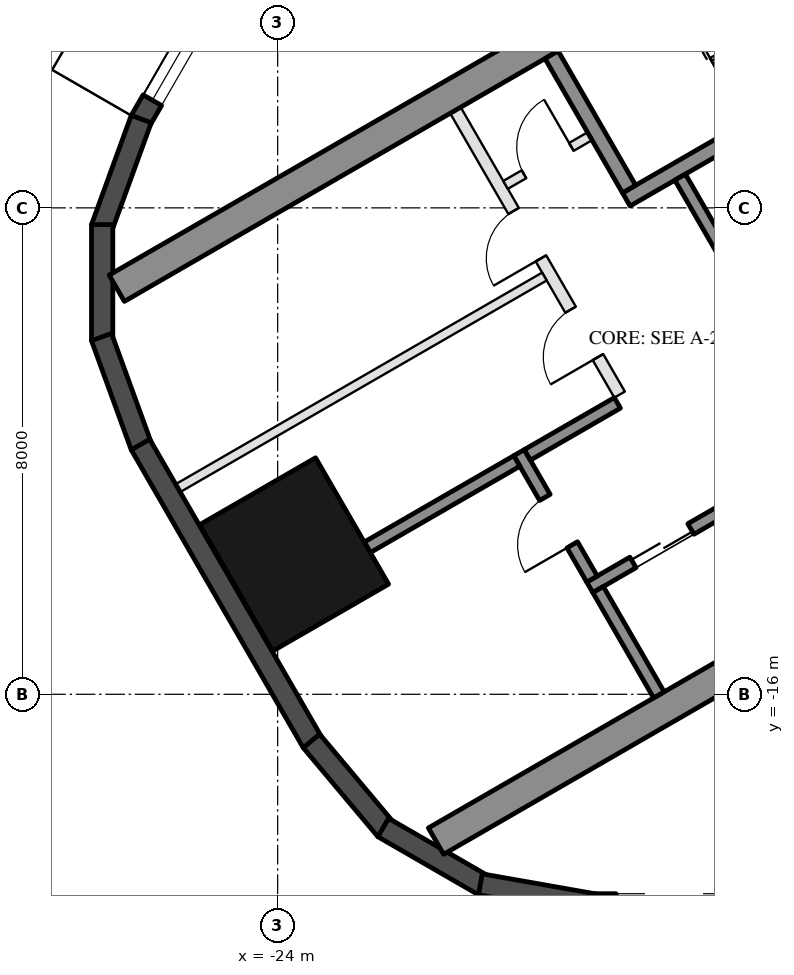
"""IFC4 building model, lengths in metres.
Left out: names, types, materials, properties, quantities, classifications, styles, units other than length and angle.
Written with IfcOpenShell. Run it as: python <this file> out.ifc"""

import sys

from ifc_helpers import new_model, si_unit, direction, frame, frame_2d, origin, origin_2d, place, context, subcontext, project, spatial, rectangle, hollow_rectangle, extrude, element, fill, save


model = new_model("IFC4")
c1 = context("Model", 3, precision=1e-05, world=origin(), true_north=direction((0.0, 1.0)))
c2 = subcontext(c1, "Body", "Model", "MODEL_VIEW")
j1 = project(units=[si_unit("LENGTHUNIT", "METRE"), si_unit("PLANEANGLEUNIT", "RADIAN")], contexts=[c1])
p1 = place(None, origin())
s1 = spatial("IfcSite", under=j1, at=p1, CompositionType="ELEMENT")
p2 = place(p1, origin())
s2 = spatial("IfcBuilding", under=s1, at=p2, CompositionType="ELEMENT")
p3 = place(p2, frame((0.0, 0.0, 202.1)))
s3 = spatial("IfcBuildingStorey", under=s2, at=p3, CompositionType="ELEMENT", Elevation=202.1)
p4 = place(p3, frame((-23.729, -13.7, 0.0), z_axis=(0.0, 0.0, 1.0), x_axis=(-0.5, 0.866025403784, 0.0)))
e1 = element("IfcColumn", 1, at=p4, inside=s3, PredefinedType="COLUMN", context=c2, shape_type="SweptSolid", body=[
    extrude(hollow_rectangle(XDim=2.4, YDim=2.2, WallThickness=0.06, at=origin_2d()), origin(), (0.0, 0.0, 1.0), 3.7),
])
p5 = place(p3, frame((-24.299, -3.176, 0.0), z_axis=(0.0, 0.0, 1.0), x_axis=(-0.500028278809, -0.866009076391, 0.0)))
e2 = element("IfcWall", 2, at=p5, inside=s3, PredefinedType="SOLIDWALL", context=c2, shape_type="SweptSolid", body=[
    extrude(rectangle(XDim=3.916, YDim=0.35, at=frame_2d((1.958, 0.0))), origin(), (0.0, 0.0, 1.0), 3.55),
])
p6 = place(p5, frame((1.625, 0.0, 0.3)))
e3 = element("IfcOpeningElement", 3, at=p6, cuts=e2, PredefinedType="OPENING", context=c2, shape_type="SweptSolid", body=[
    extrude(rectangle(XDim=1.9, YDim=2.65, at=frame_2d((0.95, 1.325))), frame((0.0, 0.185, 0.0), z_axis=(0.0, -1.0, 0.0), x_axis=(1.0, 0.0, 0.0)), (0.0, 0.0, 1.0), 0.37),
])
for number, where, z_axis, x_axis in (
    (4, (-26.244, -6.54, 0.0), (0.0, 0.0, 1.0), (-0.342, -0.94, 0.0)),
    (5, (-26.886, -8.275, 0.0), (0.0, 0.0, 1.0), (0.0, -1.0, 0.0)),
    (6, (-26.897, -10.125, 0.0), (0.0, 0.0, 1.0), (0.342, -0.94, 0.0)),
):
    element("IfcWall", number, at=place(p3, frame(where, z_axis=z_axis, x_axis=x_axis)), inside=s3, PredefinedType="SOLIDWALL", context=c2, shape_type="SweptSolid", body=[
        extrude(rectangle(XDim=1.91, YDim=0.35, at=frame_2d((0.955, 0.0))), origin(), (0.0, 0.0, 1.0), 3.55),
    ])
p7 = place(p3, frame((-26.257, -11.893, 0.0), z_axis=(0.0, 0.0, 1.0), x_axis=(0.500018773155, -0.866014564827, 0.0)))
e7 = element("IfcWall", 7, at=p7, inside=s3, PredefinedType="SOLIDWALL", context=c2, shape_type="SweptSolid", body=[
    extrude(rectangle(XDim=5.658, YDim=0.35, at=frame_2d((2.829, 0.0))), origin(), (0.0, 0.0, 1.0), 3.55),
])
for number, where, z_axis, x_axis in (
    (8, (-23.445, -16.768, 0.0), (0.0, 0.0, 1.0), (0.643, -0.766, 0.0)),
    (9, (-22.264, -18.192, 0.0), (0.0, 0.0, 1.0), (0.866, -0.5, 0.0)),
):
    element("IfcWall", number, at=place(p3, frame(where, z_axis=z_axis, x_axis=x_axis)), inside=s3, PredefinedType="SOLIDWALL", context=c2, shape_type="SweptSolid", body=[
        extrude(rectangle(XDim=1.91, YDim=0.35, at=frame_2d((0.955, 0.0))), origin(), (0.0, 0.0, 1.0), 3.55),
    ])
p8 = place(p3, frame((-20.667, -19.126, 0.0), z_axis=(0.0, 0.0, 1.0), x_axis=(0.984798995425, -0.173697837091, 0.0)))
e10 = element("IfcWall", 10, at=p8, inside=s3, PredefinedType="SOLIDWALL", context=c2, shape_type="SweptSolid", body=[
    extrude(rectangle(XDim=1.91, YDim=0.35, at=frame_2d((0.955, 0.0))), origin(), (0.0, 0.0, 1.0), 3.55),
])
p9 = place(p3, frame((-18.816, -19.455, 0.0), z_axis=(0.0, 0.0, 1.0), x_axis=(1.0, 0.0, 0.0)))
e11 = element("IfcWall", 11, at=p9, inside=s3, PredefinedType="SOLIDWALL", context=c2, shape_type="SweptSolid", body=[
    extrude(rectangle(XDim=11.816, YDim=0.35, at=frame_2d((5.908, 0.0))), origin(), (0.0, 0.0, 1.0), 3.55),
])
p10 = place(p9, frame((0.381, 0.0, 0.3)))
e12 = element("IfcOpeningElement", 12, at=p10, cuts=e11, PredefinedType="OPENING", context=c2, shape_type="SweptSolid", body=[
    extrude(rectangle(XDim=1.9, YDim=2.65, at=frame_2d((0.95, 1.325))), frame((0.0, 0.185, 0.0), z_axis=(0.0, -1.0, 0.0), x_axis=(1.0, 0.0, 0.0)), (0.0, 0.0, 1.0), 0.37),
])
p11 = place(p9, frame((7.79, 0.0, 0.0)))
e13 = element("IfcOpeningElement", 13, at=p11, cuts=e11, PredefinedType="OPENING", context=c2, shape_type="SweptSolid", body=[
    extrude(rectangle(XDim=2.4, YDim=2.4, at=frame_2d((1.2, 1.2))), frame((0.0, 0.185, 0.0), z_axis=(0.0, -1.0, 0.0), x_axis=(1.0, 0.0, 0.0)), (0.0, 0.0, 1.0), 0.37),
])
p12 = place(p9, frame((3.741, 0.0, 0.3)))
e14 = element("IfcOpeningElement", 14, at=p12, cuts=e11, PredefinedType="OPENING", context=c2, shape_type="SweptSolid", body=[
    extrude(rectangle(XDim=1.7, YDim=2.65, at=frame_2d((0.85, 1.325))), frame((0.0, 0.185, 0.0), z_axis=(0.0, -1.0, 0.0), x_axis=(1.0, 0.0, 0.0)), (0.0, 0.0, 1.0), 0.37),
])
p13 = place(p9, frame((5.741, 0.0, 0.3)))
e15 = element("IfcOpeningElement", 15, at=p13, cuts=e11, PredefinedType="OPENING", context=c2, shape_type="SweptSolid", body=[
    extrude(rectangle(XDim=1.7, YDim=2.65, at=frame_2d((0.85, 1.325))), frame((0.0, 0.185, 0.0), z_axis=(0.0, -1.0, 0.0), x_axis=(1.0, 0.0, 0.0)), (0.0, 0.0, 1.0), 0.37),
])
for number, where, z_axis, x_axis in (
    (16, (-13.797, -1.903, 0.0), (0.0, 0.0, 1.0), (-0.866, -0.5, 0.0)),
    (17, (-8.547, -10.997, 0.0), (0.0, 0.0, 1.0), (-0.866, -0.5, 0.0)),
):
    element("IfcWall", number, at=place(p3, frame(where, z_axis=z_axis, x_axis=x_axis)), inside=s3, PredefinedType="SHEAR", context=c2, shape_type="SweptSolid", body=[
        extrude(rectangle(XDim=14.837, YDim=0.5, at=frame_2d((7.418, 0.0))), origin(), (0.0, 0.0, 1.0), 3.5),
    ])
p14 = place(p3, frame((-12.681, -4.636, 0.0), z_axis=(0.0, 0.0, 1.0), x_axis=(-0.866021702275, -0.500006411147, 0.0)))
e18 = element("IfcWall", 18, at=p14, inside=s3, PredefinedType="SHEAR", context=c2, shape_type="SweptSolid", body=[
    extrude(rectangle(XDim=6.45, YDim=0.25, at=frame_2d((3.225, 0.0))), origin(), (0.0, 0.0, 1.0), 3.5),
])
p15 = place(p14, frame((0.3, 0.0, 0.0)))
e19 = element("IfcOpeningElement", 19, at=p15, cuts=e18, PredefinedType="OPENING", context=c2, shape_type="SweptSolid", body=[
    extrude(rectangle(XDim=1.0, YDim=2.1, at=frame_2d((0.5, 1.05))), frame((0.0, 0.135, 0.0), z_axis=(0.0, -1.0, 0.0), x_axis=(1.0, 0.0, 0.0)), (0.0, 0.0, 1.0), 0.27),
])
p16 = place(p3, frame((-19.496, -5.482, 0.0), z_axis=(0.0, 0.0, 1.0), x_axis=(0.499990435942, -0.866030925526, 0.0)))
e20 = element("IfcWall", 20, at=p16, inside=s3, PredefinedType="SHEAR", context=c2, shape_type="SweptSolid", body=[
    extrude(rectangle(XDim=2.55, YDim=0.25, at=frame_2d((1.275, 0.0))), origin(), (0.0, 0.0, 1.0), 3.5),
])
p17 = place(p3, frame((-17.381, -7.495, 0.0), z_axis=(0.0, 0.0, 1.0), x_axis=(0.500011755427, -0.866018616679, 0.0)))
e21 = element("IfcWall", 21, at=p17, inside=s3, PredefinedType="SHEAR", context=c2, shape_type="SweptSolid", body=[
    extrude(rectangle(XDim=2.8, YDim=0.2, at=frame_2d((1.4, 0.0))), origin(), (0.0, 0.0, 1.0), 3.5),
])
p18 = place(p3, frame((-10.068, -9.162, 0.0), z_axis=(0.0, 0.0, 1.0), x_axis=(-0.866032725843, -0.499987317609, 0.0)))
e22 = element("IfcWall", 22, at=p18, inside=s3, PredefinedType="SHEAR", context=c2, shape_type="SweptSolid", body=[
    extrude(rectangle(XDim=10.16, YDim=0.2, at=frame_2d((5.08, 0.0))), origin(), (0.0, 0.0, 1.0), 3.5),
])
p19 = place(p18, frame((0.62, 0.0, 0.0)))
e23 = element("IfcOpeningElement", 23, at=p19, cuts=e22, PredefinedType="OPENING", context=c2, shape_type="SweptSolid", body=[
    extrude(rectangle(XDim=1.1, YDim=2.1, at=frame_2d((0.55, 1.05))), frame((0.0, 0.11, 0.0), z_axis=(0.0, -1.0, 0.0), x_axis=(1.0, 0.0, 0.0)), (0.0, 0.0, 1.0), 0.22),
])
p20 = place(p18, frame((3.16, 0.0, 0.0)))
e24 = element("IfcOpeningElement", 24, at=p20, cuts=e22, PredefinedType="OPENING", context=c2, shape_type="SweptSolid", body=[
    extrude(rectangle(XDim=1.1, YDim=2.1, at=frame_2d((0.55, 1.05))), frame((0.0, 0.11, 0.0), z_axis=(0.0, -1.0, 0.0), x_axis=(1.0, 0.0, 0.0)), (0.0, 0.0, 1.0), 0.22),
])
p21 = place(p18, frame((5.7, 0.0, 0.0)))
e25 = element("IfcOpeningElement", 25, at=p21, cuts=e22, PredefinedType="OPENING", context=c2, shape_type="SweptSolid", body=[
    extrude(rectangle(XDim=1.1, YDim=2.1, at=frame_2d((0.55, 1.05))), frame((0.0, 0.11, 0.0), z_axis=(0.0, -1.0, 0.0), x_axis=(1.0, 0.0, 0.0)), (0.0, 0.0, 1.0), 0.22),
])
p22 = place(p18, frame((8.24, 0.0, 0.0)))
e26 = element("IfcOpeningElement", 26, at=p22, cuts=e22, PredefinedType="OPENING", context=c2, shape_type="SweptSolid", body=[
    extrude(rectangle(XDim=1.1, YDim=2.1, at=frame_2d((0.55, 1.05))), frame((0.0, 0.11, 0.0), z_axis=(0.0, -1.0, 0.0), x_axis=(1.0, 0.0, 0.0)), (0.0, 0.0, 1.0), 0.22),
])
p23 = place(p3, frame((-20.031, -12.026, 0.0), z_axis=(0.0, 0.0, 1.0), x_axis=(0.500033551112, -0.866006032174, 0.0)))
e27 = element("IfcWall", 27, at=p23, inside=s3, PredefinedType="SHEAR", context=c2, shape_type="SweptSolid", body=[
    extrude(rectangle(XDim=2.4, YDim=0.2, at=frame_2d((1.2, 0.0))), origin(), (0.0, 0.0, 1.0), 3.5),
])
p24 = place(p23, frame((0.85, 0.0, 0.0)))
e28 = element("IfcOpeningElement", 28, at=p24, cuts=e27, PredefinedType="OPENING", context=c2, shape_type="SweptSolid", body=[
    extrude(rectangle(XDim=0.9, YDim=2.1, at=frame_2d((0.45, 1.05))), frame((0.0, 0.11, 0.0), z_axis=(0.0, -1.0, 0.0), x_axis=(1.0, 0.0, 0.0)), (0.0, 0.0, 1.0), 0.22),
])
p25 = place(p3, frame((-18.413, -11.208, 0.0), z_axis=(0.0, 0.0, 1.0), x_axis=(-0.866038183914, -0.499977863513, 0.0)))
e29 = element("IfcWall", 29, at=p25, inside=s3, PredefinedType="SHEAR", context=c2, shape_type="SweptSolid", body=[
    extrude(rectangle(XDim=1.71, YDim=0.2, at=frame_2d((0.855, 0.0))), origin(), (0.0, 0.0, 1.0), 3.5),
])
p26 = place(p3, frame((-18.73, -14.278, 0.0), z_axis=(0.0, 0.0, 1.0), x_axis=(0.50002537861, -0.866010750942, 0.0)))
e30 = element("IfcWall", 30, at=p26, inside=s3, PredefinedType="SHEAR", context=c2, shape_type="SweptSolid", body=[
    extrude(rectangle(XDim=2.0, YDim=0.2, at=frame_2d((1.0, 0.0))), origin(), (0.0, 0.0, 1.0), 3.5),
])
p27 = place(p3, frame((-20.067, -12.163, 0.0), z_axis=(0.0, 0.0, 1.0), x_axis=(-0.866055327414, -0.49994816717, 0.0)))
e31 = element("IfcWall", 31, at=p27, inside=s3, PredefinedType="SHEAR", context=c2, shape_type="SweptSolid", body=[
    extrude(rectangle(XDim=2.84, YDim=0.2, at=frame_2d((1.42, 0.0))), origin(), (0.0, 0.0, 1.0), 3.5),
])
p28 = place(p3, frame((-21.076, -6.395, 0.0), z_axis=(0.0, 0.0, 1.0), x_axis=(0.50001468107, -0.866016927499, 0.0)))
e32 = element("IfcWall", 32, at=p28, inside=s3, PredefinedType="PARTITIONING", context=c2, shape_type="SweptSolid", body=[
    extrude(rectangle(XDim=5.4, YDim=0.2, at=frame_2d((2.7, 0.0))), origin(), (0.0, 0.0, 1.0), 3.5),
])
p29 = place(p28, frame((1.913, 0.0, 0.0)))
e33 = element("IfcOpeningElement", 33, at=p29, cuts=e32, PredefinedType="OPENING", context=c2, shape_type="SweptSolid", body=[
    extrude(rectangle(XDim=0.9, YDim=2.1, at=frame_2d((0.45, 1.05))), frame((0.0, 0.11, 0.0), z_axis=(0.0, -1.0, 0.0), x_axis=(1.0, 0.0, 0.0)), (0.0, 0.0, 1.0), 0.22),
])
p30 = place(p28, frame((3.788, 0.0, 0.0)))
e34 = element("IfcOpeningElement", 34, at=p30, cuts=e32, PredefinedType="OPENING", context=c2, shape_type="SweptSolid", body=[
    extrude(rectangle(XDim=0.9, YDim=2.1, at=frame_2d((0.45, 1.05))), frame((0.0, 0.11, 0.0), z_axis=(0.0, -1.0, 0.0), x_axis=(1.0, 0.0, 0.0)), (0.0, 0.0, 1.0), 0.22),
])
p31 = place(p3, frame((-18.866, -6.822, 0.0), z_axis=(0.0, 0.0, 1.0), x_axis=(-0.866028054938, -0.499995408039, 0.0)))
e35 = element("IfcWall", 35, at=p31, inside=s3, PredefinedType="PARTITIONING", context=c2, shape_type="SweptSolid", body=[
    extrude(rectangle(XDim=1.6, YDim=0.15, at=frame_2d((0.8, 0.0))), origin(), (0.0, 0.0, 1.0), 3.5),
])
p32 = place(p31, frame((0.35, 0.0, 0.0)))
e36 = element("IfcOpeningElement", 36, at=p32, cuts=e35, PredefinedType="OPENING", context=c2, shape_type="SweptSolid", body=[
    extrude(rectangle(XDim=0.9, YDim=2.1, at=frame_2d((0.45, 1.05))), frame((0.0, 0.085, 0.0), z_axis=(0.0, -1.0, 0.0), x_axis=(1.0, 0.0, 0.0)), (0.0, 0.0, 1.0), 0.17),
])
p33 = place(p3, frame((-19.613, -9.13, 0.0), z_axis=(0.0, 0.0, 1.0), x_axis=(-0.866031734426, -0.499989034847, 0.0)))
e37 = element("IfcWall", 37, at=p33, inside=s3, PredefinedType="PARTITIONING", context=c2, shape_type="SweptSolid", body=[
    extrude(rectangle(XDim=6.95, YDim=0.15, at=frame_2d((3.475, 0.0))), origin(), (0.0, 0.0, 1.0), 3.5),
])
p34 = place(p6, origin())
e38 = element("IfcWindow", 38, at=p34, inside=s3, PartitioningType="SINGLE_PANEL", PredefinedType="WINDOW", context=c2, shape_type="SweptSolid", body=[
    extrude(rectangle(XDim=1.9, YDim=2.65, at=frame_2d((0.95, 1.325))), frame((0.0, 0.03, 0.0), z_axis=(0.0, -1.0, 0.0), x_axis=(1.0, 0.0, 0.0)), (0.0, 0.0, 1.0), 0.06),
])
fill(e3, e38)
p35 = place(p32, frame((0.9, 0.0, 0.0), z_axis=(0.0, 0.0, 1.0), x_axis=(-1.0, 0.0, 0.0)))
e39 = element("IfcDoor", 39, at=p35, inside=s3, OperationType="SINGLE_SWING_RIGHT", PredefinedType="DOOR", context=c2, shape_type="SweptSolid", body=[
    extrude(rectangle(XDim=0.9, YDim=2.1, at=frame_2d((0.45, 1.05))), frame((0.0, 0.025, 0.0), z_axis=(0.0, -1.0, 0.0), x_axis=(1.0, 0.0, 0.0)), (0.0, 0.0, 1.0), 0.05),
])
fill(e36, e39)
p36 = place(p22, origin())
e40 = element("IfcDoor", 40, at=p36, inside=s3, OperationType="DOUBLE_DOOR_SLIDING", PredefinedType="DOOR", context=c2, shape_type="SweptSolid", body=[
    extrude(rectangle(XDim=1.1, YDim=2.1, at=frame_2d((0.55, 1.05))), frame((0.0, 0.025, 0.0), z_axis=(0.0, -1.0, 0.0), x_axis=(1.0, 0.0, 0.0)), (0.0, 0.0, 1.0), 0.05),
])
fill(e26, e40)
p37 = place(p24, frame((0.9, 0.0, 0.0), z_axis=(0.0, 0.0, 1.0), x_axis=(-1.0, 0.0, 0.0)))
e41 = element("IfcDoor", 41, at=p37, inside=s3, OperationType="SINGLE_SWING_LEFT", PredefinedType="DOOR", context=c2, shape_type="SweptSolid", body=[
    extrude(rectangle(XDim=0.9, YDim=2.1, at=frame_2d((0.45, 1.05))), frame((0.0, 0.025, 0.0), z_axis=(0.0, -1.0, 0.0), x_axis=(1.0, 0.0, 0.0)), (0.0, 0.0, 1.0), 0.05),
])
fill(e28, e41)
p38 = place(p29, frame((0.9, 0.0, 0.0), z_axis=(0.0, 0.0, 1.0), x_axis=(-1.0, 0.0, 0.0)))
e42 = element("IfcDoor", 42, at=p38, inside=s3, OperationType="SINGLE_SWING_LEFT", PredefinedType="DOOR", context=c2, shape_type="SweptSolid", body=[
    extrude(rectangle(XDim=0.9, YDim=2.1, at=frame_2d((0.45, 1.05))), frame((0.0, 0.025, 0.0), z_axis=(0.0, -1.0, 0.0), x_axis=(1.0, 0.0, 0.0)), (0.0, 0.0, 1.0), 0.05),
])
fill(e33, e42)
p39 = place(p30, frame((0.9, 0.0, 0.0), z_axis=(0.0, 0.0, 1.0), x_axis=(-1.0, 0.0, 0.0)))
e43 = element("IfcDoor", 43, at=p39, inside=s3, OperationType="SINGLE_SWING_LEFT", PredefinedType="DOOR", context=c2, shape_type="SweptSolid", body=[
    extrude(rectangle(XDim=0.9, YDim=2.1, at=frame_2d((0.45, 1.05))), frame((0.0, 0.025, 0.0), z_axis=(0.0, -1.0, 0.0), x_axis=(1.0, 0.0, 0.0)), (0.0, 0.0, 1.0), 0.05),
])
fill(e34, e43)
save(model, sys.argv[1])
